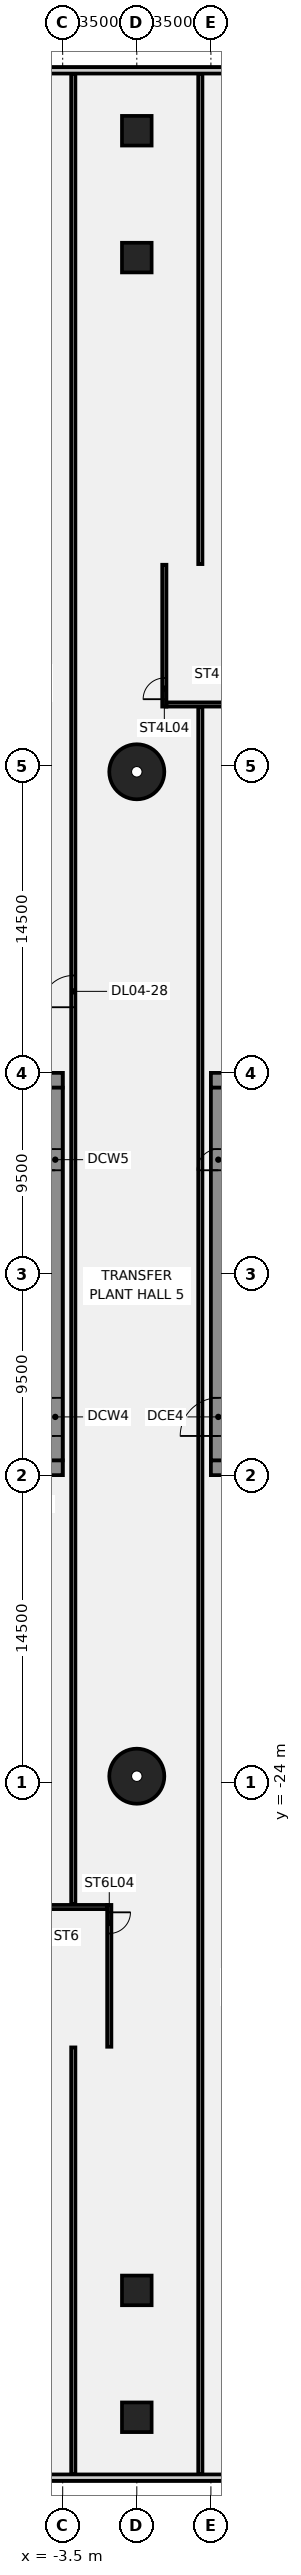
"""IFC4 building model, lengths in metres.
Left out: names, types, materials, properties, quantities, classifications, styles, units other than length and angle.
Written with IfcOpenShell. Run it as: python <this file> out.ifc"""

import sys

from ifc_helpers import new_model, si_unit, direction, frame, frame_2d, origin, origin_2d, place, context, subcontext, project, spatial, polyline, rectangle, circle, outline, extrude, element, fill, save


model = new_model("IFC4")
c1 = context("Model", 3, precision=1e-05, world=origin(), true_north=direction((0.0, 1.0)))
c2 = subcontext(c1, "Body", "Model", "MODEL_VIEW")
j1 = project(units=[si_unit("LENGTHUNIT", "METRE"), si_unit("PLANEANGLEUNIT", "RADIAN")], contexts=[c1])
p1 = place(None, origin())
s1 = spatial("IfcSite", under=j1, at=p1, CompositionType="ELEMENT")
p2 = place(p1, origin())
s2 = spatial("IfcBuilding", under=s1, at=p2, CompositionType="ELEMENT")
p3 = place(p2, frame((0.0, 0.0, 25.0)))
s3 = spatial("IfcBuildingStorey", under=s2, at=p3, CompositionType="ELEMENT", Elevation=25.0)
for number, where, z_axis, x_axis in (
    (1, (0.0, 23.721, -0.45), (0.0, 0.0, 1.0), (1.0, 0.0, 0.0)),
    (2, (0.0, -23.721, -0.45), (0.0, 0.0, 1.0), (1.0, 0.0, 0.0)),
):
    element("IfcColumn", number, at=place(p3, frame(where, z_axis=z_axis, x_axis=x_axis)), inside=s3, PredefinedType="COLUMN", context=c2, shape_type="SweptSolid", body=[
        extrude(circle(Radius=1.3, at=origin_2d()), origin(), (0.0, 0.0, 1.0), 4.35),
    ])
for number, where, z_axis, x_axis in (
    (3, (0.0, 48.008, -0.45), (0.0, 0.0, 1.0), (1.0, 0.0, 0.0)),
    (4, (0.0, -48.008, -0.45), (0.0, 0.0, 1.0), (1.0, 0.0, 0.0)),
    (5, (0.0, -54.0, -0.45), (0.0, 0.0, 1.0), (1.0, 0.0, 0.0)),
    (6, (0.0, 54.0, -0.45), (0.0, 0.0, 1.0), (1.0, 0.0, 0.0)),
):
    element("IfcColumn", number, at=place(p3, frame(where, z_axis=z_axis, x_axis=x_axis)), inside=s3, PredefinedType="COLUMN", context=c2, shape_type="SweptSolid", body=[
        extrude(rectangle(XDim=1.4, YDim=1.4, at=origin_2d()), origin(), (0.0, 0.0, 1.0), 4.35),
    ])
p4 = place(p3, frame((-3.0, -56.699, 0.0), z_axis=(0.0, 0.0, 1.0), x_axis=(0.0, 1.0, 0.0)))
e7 = element("IfcWall", 7, at=p4, inside=s3, PredefinedType="PARTITIONING", context=c2, shape_type="SweptSolid", body=[
    extrude(rectangle(XDim=20.169, YDim=0.2, at=frame_2d((10.084, 0.0))), origin(), (0.0, 0.0, 1.0), 3.9),
])
p5 = place(p3, frame((-3.0, -29.77, 0.0), z_axis=(0.0, 0.0, 1.0), x_axis=(0.0, 1.0, 0.0)))
e8 = element("IfcWall", 8, at=p5, inside=s3, PredefinedType="PARTITIONING", context=c2, shape_type="SweptSolid", body=[
    extrude(rectangle(XDim=86.469, YDim=0.2, at=frame_2d((43.234, 0.0))), origin(), (0.0, 0.0, 1.0), 3.9),
])
p6 = place(p5, frame((42.37, 0.0, 0.0)))
e9 = element("IfcOpeningElement", 9, at=p6, cuts=e8, PredefinedType="OPENING", context=c2, shape_type="SweptSolid", body=[
    extrude(rectangle(XDim=1.5, YDim=2.1, at=frame_2d((0.75, 1.05))), frame((0.0, 0.11, 0.0), z_axis=(0.0, -1.0, 0.0), x_axis=(1.0, 0.0, 0.0)), (0.0, 0.0, 1.0), 0.22),
])
p7 = place(p3, frame((3.0, -56.699, 0.0), z_axis=(0.0, 0.0, 1.0), x_axis=(0.0, 1.0, 0.0)))
e10 = element("IfcWall", 10, at=p7, inside=s3, PredefinedType="PARTITIONING", context=c2, shape_type="SweptSolid", body=[
    extrude(rectangle(XDim=83.469, YDim=0.2, at=frame_2d((41.734, 0.0))), origin(), (0.0, 0.0, 1.0), 3.9),
])
p8 = place(p3, frame((3.0, 33.53, 0.0), z_axis=(0.0, 0.0, 1.0), x_axis=(0.0, 1.0, 0.0)))
e11 = element("IfcWall", 11, at=p8, inside=s3, PredefinedType="PARTITIONING", context=c2, shape_type="SweptSolid", body=[
    extrude(rectangle(XDim=23.169, YDim=0.2, at=frame_2d((11.584, 0.0))), origin(), (0.0, 0.0, 1.0), 3.9),
])
p9 = place(p3, frame((55.988, 56.85, 0.0), z_axis=(0.0, 0.0, 1.0), x_axis=(-1.0, 0.0, 0.0)))
e12 = element("IfcWall", 12, at=p9, inside=s3, PredefinedType="SOLIDWALL", context=c2, shape_type="SweptSolid", body=[
    extrude(rectangle(XDim=111.977, YDim=0.3, at=frame_2d((55.988, 0.0))), origin(), (0.0, 0.0, 1.0), 3.9),
])
p10 = place(p9, frame((12.488, 0.0, 1.4)))
e13 = element("IfcOpeningElement", 13, at=p10, cuts=e12, PredefinedType="OPENING", context=c2, shape_type="SweptSolid", body=[
    extrude(rectangle(XDim=6.0, YDim=2.2, at=frame_2d((3.0, 1.1))), frame((0.0, 0.16, 0.0), z_axis=(0.0, -1.0, 0.0), x_axis=(1.0, 0.0, 0.0)), (0.0, 0.0, 1.0), 0.32),
])
p11 = place(p3, frame((-55.988, -56.85, 0.0), z_axis=(0.0, 0.0, 1.0), x_axis=(1.0, 0.0, 0.0)))
e14 = element("IfcWall", 14, at=p11, inside=s3, PredefinedType="SOLIDWALL", context=c2, shape_type="SweptSolid", body=[
    extrude(rectangle(XDim=111.977, YDim=0.3, at=frame_2d((55.988, 0.0))), origin(), (0.0, 0.0, 1.0), 3.9),
])
p12 = place(p11, frame((12.488, 0.0, 1.4)))
e15 = element("IfcOpeningElement", 15, at=p12, cuts=e14, PredefinedType="OPENING", context=c2, shape_type="SweptSolid", body=[
    extrude(rectangle(XDim=6.0, YDim=2.2, at=frame_2d((3.0, 1.1))), frame((0.0, 0.16, 0.0), z_axis=(0.0, -1.0, 0.0), x_axis=(1.0, 0.0, 0.0)), (0.0, 0.0, 1.0), 0.32),
])
p13 = place(p3, frame((-16.5, -9.15, 0.0), z_axis=(0.0, 0.0, 1.0), x_axis=(1.0, 0.0, 0.0)))
e16 = element("IfcWall", 16, at=p13, inside=s3, PredefinedType="SHEAR", context=c2, shape_type="SweptSolid", body=[
    extrude(rectangle(XDim=13.0, YDim=0.7, at=frame_2d((6.5, 0.0))), origin(), (0.0, 0.0, 1.0), 3.9),
])
p14 = place(p13, frame((4.15, 0.0, 0.0)))
e17 = element("IfcOpeningElement", 17, at=p14, cuts=e16, PredefinedType="OPENING", context=c2, shape_type="SweptSolid", body=[
    extrude(rectangle(XDim=1.4, YDim=2.1, at=frame_2d((0.7, 1.05))), frame((0.0, 0.36, 0.0), z_axis=(0.0, -1.0, 0.0), x_axis=(1.0, 0.0, 0.0)), (0.0, 0.0, 1.0), 0.72),
])
p15 = place(p13, frame((10.125, 0.0, 0.0)))
e18 = element("IfcOpeningElement", 18, at=p15, cuts=e16, PredefinedType="OPENING", context=c2, shape_type="SweptSolid", body=[
    extrude(rectangle(XDim=1.4, YDim=2.1, at=frame_2d((0.7, 1.05))), frame((0.0, 0.36, 0.0), z_axis=(0.0, -1.0, 0.0), x_axis=(1.0, 0.0, 0.0)), (0.0, 0.0, 1.0), 0.72),
])
p16 = place(p3, frame((-16.5, 9.15, 0.0), z_axis=(0.0, 0.0, 1.0), x_axis=(1.0, 0.0, 0.0)))
e19 = element("IfcWall", 19, at=p16, inside=s3, PredefinedType="SHEAR", context=c2, shape_type="SweptSolid", body=[
    extrude(rectangle(XDim=13.0, YDim=0.7, at=frame_2d((6.5, 0.0))), origin(), (0.0, 0.0, 1.0), 3.9),
])
p17 = place(p3, frame((-3.85, -8.8, 0.0), z_axis=(0.0, 0.0, 1.0), x_axis=(0.0, 1.0, 0.0)))
e20 = element("IfcWall", 20, at=p17, inside=s3, PredefinedType="SHEAR", context=c2, shape_type="SweptSolid", body=[
    extrude(rectangle(XDim=17.6, YDim=0.7, at=frame_2d((8.8, 0.0))), origin(), (0.0, 0.0, 1.0), 3.9),
])
p18 = place(p17, frame((1.15, 0.0, 0.0)))
e21 = element("IfcOpeningElement", 21, at=p18, cuts=e20, PredefinedType="OPENING", context=c2, shape_type="SweptSolid", body=[
    extrude(rectangle(XDim=1.8, YDim=2.1, at=frame_2d((0.9, 1.05))), frame((0.0, 0.36, 0.0), z_axis=(0.0, -1.0, 0.0), x_axis=(1.0, 0.0, 0.0)), (0.0, 0.0, 1.0), 0.72),
])
p19 = place(p17, frame((13.7, 0.0, 0.0)))
e22 = element("IfcOpeningElement", 22, at=p19, cuts=e20, PredefinedType="OPENING", context=c2, shape_type="SweptSolid", body=[
    extrude(rectangle(XDim=1.0, YDim=2.1, at=frame_2d((0.5, 1.05))), frame((0.0, 0.36, 0.0), z_axis=(0.0, -1.0, 0.0), x_axis=(1.0, 0.0, 0.0)), (0.0, 0.0, 1.0), 0.72),
])
p20 = place(p3, frame((16.5, -9.15, 0.0), z_axis=(0.0, 0.0, 1.0), x_axis=(-1.0, 0.0, 0.0)))
e23 = element("IfcWall", 23, at=p20, inside=s3, PredefinedType="SHEAR", context=c2, shape_type="SweptSolid", body=[
    extrude(rectangle(XDim=13.0, YDim=0.7, at=frame_2d((6.5, 0.0))), origin(), (0.0, 0.0, 1.0), 3.9),
])
p21 = place(p20, frame((4.15, 0.0, 0.0)))
e24 = element("IfcOpeningElement", 24, at=p21, cuts=e23, PredefinedType="OPENING", context=c2, shape_type="SweptSolid", body=[
    extrude(rectangle(XDim=1.4, YDim=2.1, at=frame_2d((0.7, 1.05))), frame((0.0, 0.36, 0.0), z_axis=(0.0, -1.0, 0.0), x_axis=(1.0, 0.0, 0.0)), (0.0, 0.0, 1.0), 0.72),
])
p22 = place(p20, frame((10.125, 0.0, 0.0)))
e25 = element("IfcOpeningElement", 25, at=p22, cuts=e23, PredefinedType="OPENING", context=c2, shape_type="SweptSolid", body=[
    extrude(rectangle(XDim=1.4, YDim=2.1, at=frame_2d((0.7, 1.05))), frame((0.0, 0.36, 0.0), z_axis=(0.0, -1.0, 0.0), x_axis=(1.0, 0.0, 0.0)), (0.0, 0.0, 1.0), 0.72),
])
p23 = place(p3, frame((16.5, 9.15, 0.0), z_axis=(0.0, 0.0, 1.0), x_axis=(-1.0, 0.0, 0.0)))
e26 = element("IfcWall", 26, at=p23, inside=s3, PredefinedType="SHEAR", context=c2, shape_type="SweptSolid", body=[
    extrude(rectangle(XDim=13.0, YDim=0.7, at=frame_2d((6.5, 0.0))), origin(), (0.0, 0.0, 1.0), 3.9),
])
p24 = place(p3, frame((3.85, -8.8, 0.0), z_axis=(0.0, 0.0, 1.0), x_axis=(0.0, 1.0, 0.0)))
e27 = element("IfcWall", 27, at=p24, inside=s3, PredefinedType="SHEAR", context=c2, shape_type="SweptSolid", body=[
    extrude(rectangle(XDim=17.6, YDim=0.7, at=frame_2d((8.8, 0.0))), origin(), (0.0, 0.0, 1.0), 3.9),
])
p25 = place(p24, frame((1.15, 0.0, 0.0)))
e28 = element("IfcOpeningElement", 28, at=p25, cuts=e27, PredefinedType="OPENING", context=c2, shape_type="SweptSolid", body=[
    extrude(rectangle(XDim=1.8, YDim=2.1, at=frame_2d((0.9, 1.05))), frame((0.0, 0.36, 0.0), z_axis=(0.0, -1.0, 0.0), x_axis=(1.0, 0.0, 0.0)), (0.0, 0.0, 1.0), 0.72),
])
p26 = place(p24, frame((13.7, 0.0, 0.0)))
e29 = element("IfcOpeningElement", 29, at=p26, cuts=e27, PredefinedType="OPENING", context=c2, shape_type="SweptSolid", body=[
    extrude(rectangle(XDim=1.0, YDim=2.1, at=frame_2d((0.5, 1.05))), frame((0.0, 0.36, 0.0), z_axis=(0.0, -1.0, 0.0), x_axis=(1.0, 0.0, 0.0)), (0.0, 0.0, 1.0), 0.72),
])
p27 = place(p3, frame((1.3, 26.8, 0.0), z_axis=(0.0, 0.0, 1.0), x_axis=(0.0, 1.0, 0.0)))
e30 = element("IfcWall", 30, at=p27, inside=s3, PredefinedType="SHEAR", context=c2, shape_type="SweptSolid", body=[
    extrude(rectangle(XDim=6.7, YDim=0.2, at=frame_2d((3.35, 0.0))), origin(), (0.0, 0.0, 1.0), 3.9),
])
p28 = place(p27, frame((0.35, 0.0, 0.0)))
e31 = element("IfcOpeningElement", 31, at=p28, cuts=e30, PredefinedType="OPENING", context=c2, shape_type="SweptSolid", body=[
    extrude(rectangle(XDim=1.0, YDim=2.1, at=frame_2d((0.5, 1.05))), frame((0.0, 0.11, 0.0), z_axis=(0.0, -1.0, 0.0), x_axis=(1.0, 0.0, 0.0)), (0.0, 0.0, 1.0), 0.22),
])
p29 = place(p3, frame((4.6, 26.9, 0.0), z_axis=(0.0, 0.0, 1.0), x_axis=(-1.0, 0.0, 0.0)))
e32 = element("IfcWall", 32, at=p29, inside=s3, PredefinedType="SHEAR", context=c2, shape_type="SweptSolid", body=[
    extrude(rectangle(XDim=3.2, YDim=0.2, at=frame_2d((1.6, 0.0))), origin(), (0.0, 0.0, 1.0), 3.9),
])
p30 = place(p3, origin())
e33 = element("IfcWall", 33, at=p30, inside=s3, PredefinedType="SHEAR", context=c2, shape_type="SweptSolid", body=[
    extrude(outline(polyline([(4.6, 33.3), (4.6, 33.5), (1.4, 33.5), (1.4, 33.3), (4.6, 33.3)])), origin(), (0.0, 0.0, 1.0), 3.9),
])
p31 = place(p3, frame((-1.3, -29.8, 0.0), z_axis=(0.0, 0.0, 1.0), x_axis=(0.0, -1.0, 0.0)))
e34 = element("IfcWall", 34, at=p31, inside=s3, PredefinedType="SHEAR", context=c2, shape_type="SweptSolid", body=[
    extrude(rectangle(XDim=6.7, YDim=0.2, at=frame_2d((3.35, 0.0))), origin(), (0.0, 0.0, 1.0), 3.9),
])
p32 = place(p31, frame((0.35, 0.0, 0.0)))
e35 = element("IfcOpeningElement", 35, at=p32, cuts=e34, PredefinedType="OPENING", context=c2, shape_type="SweptSolid", body=[
    extrude(rectangle(XDim=1.0, YDim=2.1, at=frame_2d((0.5, 1.05))), frame((0.0, 0.11, 0.0), z_axis=(0.0, -1.0, 0.0), x_axis=(1.0, 0.0, 0.0)), (0.0, 0.0, 1.0), 0.22),
])
p33 = place(p3, frame((-4.6, -29.9, 0.0), z_axis=(0.0, 0.0, 1.0), x_axis=(1.0, 0.0, 0.0)))
e36 = element("IfcWall", 36, at=p33, inside=s3, PredefinedType="SHEAR", context=c2, shape_type="SweptSolid", body=[
    extrude(rectangle(XDim=3.2, YDim=0.2, at=frame_2d((1.6, 0.0))), origin(), (0.0, 0.0, 1.0), 3.9),
])
p34 = place(p3, origin())
e37 = element("IfcWall", 37, at=p34, inside=s3, PredefinedType="SHEAR", context=c2, shape_type="SweptSolid", body=[
    extrude(outline(polyline([(-4.6, -36.3), (-4.6, -36.5), (-1.4, -36.5), (-1.4, -36.3), (-4.6, -36.3)])), origin(), (0.0, 0.0, 1.0), 3.9),
])
p35 = place(p6, origin())
e38 = element("IfcDoor", 38, at=p35, inside=s3, OperationType="SINGLE_SWING_RIGHT", PredefinedType="DOOR", context=c2, shape_type="SweptSolid", body=[
    extrude(rectangle(XDim=1.5, YDim=2.1, at=frame_2d((0.75, 1.05))), frame((0.0, 0.025, 0.0), z_axis=(0.0, -1.0, 0.0), x_axis=(1.0, 0.0, 0.0)), (0.0, 0.0, 1.0), 0.05),
])
fill(e9, e38)
p36 = place(p18, origin())
e39 = element("IfcDoor", 39, at=p36, inside=s3, OperationType="SINGLE_SWING_LEFT", PredefinedType="DOOR", context=c2, shape_type="SweptSolid", body=[
    extrude(rectangle(XDim=1.8, YDim=2.1, at=frame_2d((0.9, 1.05))), frame((0.0, 0.025, 0.0), z_axis=(0.0, -1.0, 0.0), x_axis=(1.0, 0.0, 0.0)), (0.0, 0.0, 1.0), 0.05),
])
fill(e21, e39)
p37 = place(p19, origin())
e40 = element("IfcDoor", 40, at=p37, inside=s3, OperationType="SINGLE_SWING_LEFT", PredefinedType="DOOR", context=c2, shape_type="SweptSolid", body=[
    extrude(rectangle(XDim=1.0, YDim=2.1, at=frame_2d((0.5, 1.05))), frame((0.0, 0.025, 0.0), z_axis=(0.0, -1.0, 0.0), x_axis=(1.0, 0.0, 0.0)), (0.0, 0.0, 1.0), 0.05),
])
fill(e22, e40)
p38 = place(p25, origin())
e41 = element("IfcDoor", 41, at=p38, inside=s3, OperationType="SINGLE_SWING_LEFT", PredefinedType="DOOR", context=c2, shape_type="SweptSolid", body=[
    extrude(rectangle(XDim=1.8, YDim=2.1, at=frame_2d((0.9, 1.05))), frame((0.0, 0.025, 0.0), z_axis=(0.0, -1.0, 0.0), x_axis=(1.0, 0.0, 0.0)), (0.0, 0.0, 1.0), 0.05),
])
fill(e28, e41)
p39 = place(p26, origin())
e42 = element("IfcDoor", 42, at=p39, inside=s3, OperationType="SINGLE_SWING_LEFT", PredefinedType="DOOR", context=c2, shape_type="SweptSolid", body=[
    extrude(rectangle(XDim=1.0, YDim=2.1, at=frame_2d((0.5, 1.05))), frame((0.0, 0.025, 0.0), z_axis=(0.0, -1.0, 0.0), x_axis=(1.0, 0.0, 0.0)), (0.0, 0.0, 1.0), 0.05),
])
fill(e29, e42)
p40 = place(p28, origin())
e43 = element("IfcDoor", 43, at=p40, inside=s3, OperationType="SINGLE_SWING_LEFT", PredefinedType="DOOR", context=c2, shape_type="SweptSolid", body=[
    extrude(rectangle(XDim=1.0, YDim=2.1, at=frame_2d((0.5, 1.05))), frame((0.0, 0.025, 0.0), z_axis=(0.0, -1.0, 0.0), x_axis=(1.0, 0.0, 0.0)), (0.0, 0.0, 1.0), 0.05),
])
fill(e31, e43)
p41 = place(p32, origin())
e44 = element("IfcDoor", 44, at=p41, inside=s3, OperationType="SINGLE_SWING_LEFT", PredefinedType="DOOR", context=c2, shape_type="SweptSolid", body=[
    extrude(rectangle(XDim=1.0, YDim=2.1, at=frame_2d((0.5, 1.05))), frame((0.0, 0.025, 0.0), z_axis=(0.0, -1.0, 0.0), x_axis=(1.0, 0.0, 0.0)), (0.0, 0.0, 1.0), 0.05),
])
fill(e35, e44)
save(model, sys.argv[1])
